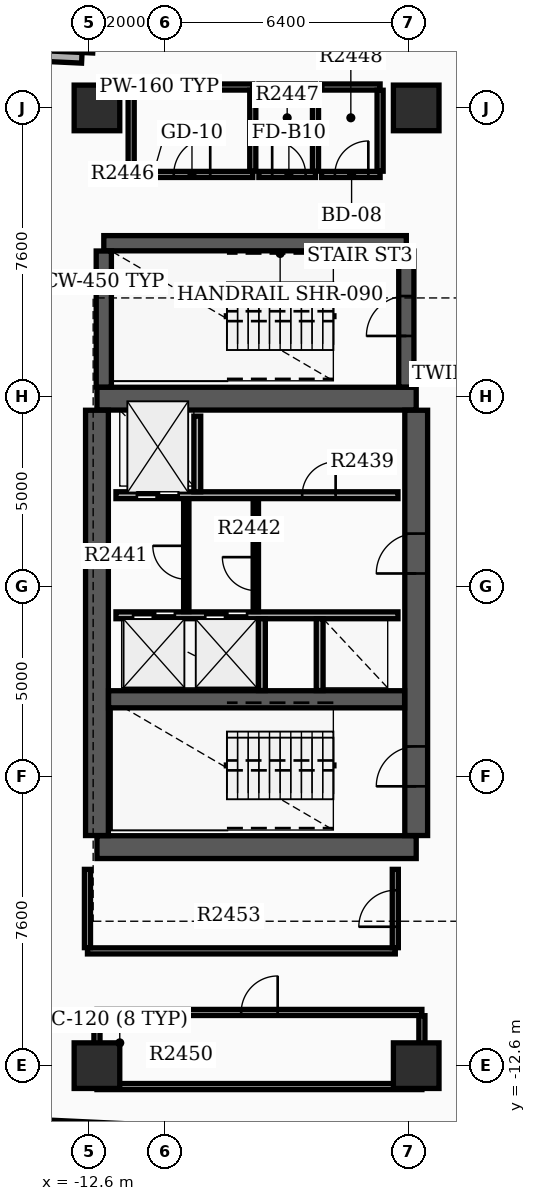
"""IFC4 building model, lengths in metres.
Left out: names, types, materials, properties, quantities, classifications, styles, units other than length and angle.
Written with IfcOpenShell. Run it as: python <this file> out.ifc"""

import sys

from ifc_helpers import new_model, si_unit, direction, frame, frame_2d, origin, origin_2d, place, context, subcontext, project, spatial, rectangle, extrude, element, fill, save


model = new_model("IFC4")
c1 = context("Model", 3, precision=1e-05, world=origin(), true_north=direction((0.0, 1.0)))
c2 = subcontext(c1, "Body", "Model", "MODEL_VIEW")
j1 = project(units=[si_unit("LENGTHUNIT", "METRE"), si_unit("PLANEANGLEUNIT", "RADIAN")], contexts=[c1])
p1 = place(None, origin())
s1 = spatial("IfcSite", under=j1, at=p1, CompositionType="ELEMENT")
p2 = place(p1, origin())
s2 = spatial("IfcBuilding", under=s1, at=p2, CompositionType="ELEMENT")
p3 = place(p2, frame((0.0, 0.0, 156.6)))
s3 = spatial("IfcBuildingStorey", under=s2, at=p3, CompositionType="ELEMENT", Elevation=156.6)
for number, where, z_axis, x_axis in (
    (1, (-12.4, -6.85, 0.0), (0.0, 0.0, 1.0), (1.0, 0.0, 0.0)),
    (2, (-12.4, 4.95, 0.0), (0.0, 0.0, 1.0), (1.0, 0.0, 0.0)),
):
    element("IfcWall", number, at=place(p3, frame(where, z_axis=z_axis, x_axis=x_axis)), inside=s3, PredefinedType="SHEAR", context=c2, shape_type="SweptSolid", body=[
        extrude(rectangle(XDim=8.4, YDim=0.6, at=frame_2d((4.2, 0.0))), origin(), (0.0, 0.0, 1.0), 3.7),
    ])
p4 = place(p3, frame((-12.4, -6.545, 0.0), z_axis=(0.0, 0.0, 1.0), x_axis=(0.0, 1.0, 0.0)))
e3 = element("IfcWall", 3, at=p4, inside=s3, PredefinedType="SHEAR", context=c2, shape_type="SweptSolid", body=[
    extrude(rectangle(XDim=11.19, YDim=0.6, at=frame_2d((5.595, 0.0))), origin(), (0.0, 0.0, 1.0), 3.7),
])
p5 = place(p3, frame((-4.0, -6.545, 0.0), z_axis=(0.0, 0.0, 1.0), x_axis=(0.0, 1.0, 0.0)))
e4 = element("IfcWall", 4, at=p5, inside=s3, PredefinedType="SHEAR", context=c2, shape_type="SweptSolid", body=[
    extrude(rectangle(XDim=11.19, YDim=0.6, at=frame_2d((5.595, 0.0))), origin(), (0.0, 0.0, 1.0), 3.7),
])
p6 = place(p5, frame((1.295, 0.0, 0.0)))
e5 = element("IfcOpeningElement", 5, at=p6, cuts=e4, PredefinedType="OPENING", context=c2, shape_type="SweptSolid", body=[
    extrude(rectangle(XDim=1.05, YDim=2.15, at=frame_2d((0.525, 1.075))), frame((0.0, 0.31, 0.0), z_axis=(0.0, -1.0, 0.0), x_axis=(1.0, 0.0, 0.0)), (0.0, 0.0, 1.0), 0.62),
])
p7 = place(p5, frame((6.895, 0.0, 0.0)))
e6 = element("IfcOpeningElement", 6, at=p7, cuts=e4, PredefinedType="OPENING", context=c2, shape_type="SweptSolid", body=[
    extrude(rectangle(XDim=1.05, YDim=2.15, at=frame_2d((0.525, 1.075))), frame((0.0, 0.31, 0.0), z_axis=(0.0, -1.0, 0.0), x_axis=(1.0, 0.0, 0.0)), (0.0, 0.0, 1.0), 0.62),
])
p8 = place(p3, frame((-12.095, -2.96, 0.0), z_axis=(0.0, 0.0, 1.0), x_axis=(1.0, 0.0, 0.0)))
e7 = element("IfcWall", 7, at=p8, inside=s3, PredefinedType="SHEAR", context=c2, shape_type="SweptSolid", body=[
    extrude(rectangle(XDim=7.79, YDim=0.45, at=frame_2d((3.895, 0.0))), origin(), (0.0, 0.0, 1.0), 3.7),
])
p9 = place(p3, frame((-12.22, 9.04, 0.0), z_axis=(0.0, 0.0, 1.0), x_axis=(1.0, 0.0, 0.0)))
e8 = element("IfcWall", 8, at=p9, inside=s3, PredefinedType="SHEAR", context=c2, shape_type="SweptSolid", body=[
    extrude(rectangle(XDim=7.96, YDim=0.4, at=frame_2d((3.98, 0.0))), origin(), (0.0, 0.0, 1.0), 3.7),
])
p10 = place(p3, frame((-12.22, 5.255, 0.0), z_axis=(0.0, 0.0, 1.0), x_axis=(0.0, 1.0, 0.0)))
e9 = element("IfcWall", 9, at=p10, inside=s3, PredefinedType="SHEAR", context=c2, shape_type="SweptSolid", body=[
    extrude(rectangle(XDim=3.58, YDim=0.4, at=frame_2d((1.79, 0.0))), origin(), (0.0, 0.0, 1.0), 3.7),
])
p11 = place(p3, frame((-4.26, 5.255, 0.0), z_axis=(0.0, 0.0, 1.0), x_axis=(0.0, 1.0, 0.0)))
e10 = element("IfcWall", 10, at=p11, inside=s3, PredefinedType="SHEAR", context=c2, shape_type="SweptSolid", body=[
    extrude(rectangle(XDim=3.58, YDim=0.4, at=frame_2d((1.79, 0.0))), origin(), (0.0, 0.0, 1.0), 3.7),
])
p12 = place(p11, frame((1.345, 0.0, 0.0)))
e11 = element("IfcOpeningElement", 11, at=p12, cuts=e10, PredefinedType="OPENING", context=c2, shape_type="SweptSolid", body=[
    extrude(rectangle(XDim=1.05, YDim=2.15, at=frame_2d((0.525, 1.075))), frame((0.0, 0.21, 0.0), z_axis=(0.0, -1.0, 0.0), x_axis=(1.0, 0.0, 0.0)), (0.0, 0.0, 1.0), 0.42),
])
for number, where, z_axis, x_axis in (
    (12, (-12.4, -12.6, 0.0), (0.0, 0.0, 1.0), (1.0, 0.0, 0.0)),
    (13, (-12.4, 12.6, 0.0), (0.0, 0.0, 1.0), (1.0, 0.0, 0.0)),
    (14, (-4.0, -12.6, 0.0), (0.0, 0.0, 1.0), (1.0, 0.0, 0.0)),
    (15, (-4.0, 12.6, 0.0), (0.0, 0.0, 1.0), (1.0, 0.0, 0.0)),
):
    element("IfcColumn", number, at=place(p3, frame(where, z_axis=z_axis, x_axis=x_axis)), inside=s3, PredefinedType="COLUMN", context=c2, shape_type="SweptSolid", body=[
        extrude(rectangle(XDim=1.2, YDim=1.2, at=origin_2d()), origin(), (0.0, 0.0, 1.0), 3.9),
    ])
p13 = place(p3, frame((-14.017, 13.976, 0.0), z_axis=(0.0, 0.0, 1.0), x_axis=(0.998883930236, -0.047232339719, 0.0)))
e16 = element("IfcWall", 16, at=p13, inside=s3, PredefinedType="STANDARD", context=c2, shape_type="SweptSolid", body=[
    extrude(rectangle(XDim=1.22, YDim=0.28, at=frame_2d((0.61, 0.0))), origin(), (0.0, 0.0, 1.0), 2.97),
])
p14 = place(p3, frame((-12.652, 14.052, 0.0), z_axis=(0.0, 0.0, 1.0), x_axis=(0.047039284441, 0.99889304018, 0.0)))
e17 = element("IfcWall", 17, at=p14, inside=s3, PredefinedType="STANDARD", context=c2, shape_type="SweptSolid", body=[
    extrude(rectangle(XDim=1.5, YDim=0.28, at=frame_2d((0.75, 0.0))), origin(), (0.0, 0.0, 1.0), 2.97),
])
p15 = place(p3, frame((-13.843, -14.164, 0.0), z_axis=(0.0, 0.0, 1.0), x_axis=(0.998889082162, -0.047123258997, 0.0)))
e18 = element("IfcWall", 18, at=p15, inside=s3, PredefinedType="STANDARD", context=c2, shape_type="SweptSolid", body=[
    extrude(rectangle(XDim=6.3, YDim=0.28, at=frame_2d((3.15, 0.0))), origin(), (0.0, 0.0, 1.0), 2.97),
])
p16 = place(p3, frame((-11.9, 2.41, 0.0), z_axis=(0.0, 0.0, 1.0), x_axis=(1.0, 0.0, 0.0)))
e19 = element("IfcWall", 19, at=p16, inside=s3, PredefinedType="SOLIDWALL", context=c2, shape_type="SweptSolid", body=[
    extrude(rectangle(XDim=7.42, YDim=0.18, at=frame_2d((3.71, 0.0))), origin(), (0.0, 0.0, 1.0), 2.96),
])
p17 = place(p16, frame((0.55, 0.0, 0.0)))
e20 = element("IfcOpeningElement", 20, at=p17, cuts=e19, PredefinedType="OPENING", context=c2, shape_type="SweptSolid", body=[
    extrude(rectangle(XDim=1.1, YDim=2.15, at=frame_2d((0.55, 1.075))), frame((0.0, 0.1, 0.0), z_axis=(0.0, -1.0, 0.0), x_axis=(1.0, 0.0, 0.0)), (0.0, 0.0, 1.0), 0.2),
])
p18 = place(p16, frame((4.9, 0.0, 0.0)))
e21 = element("IfcOpeningElement", 21, at=p18, cuts=e19, PredefinedType="OPENING", context=c2, shape_type="SweptSolid", body=[
    extrude(rectangle(XDim=0.88, YDim=2.1, at=frame_2d((0.44, 1.05))), frame((0.0, 0.1, 0.0), z_axis=(0.0, -1.0, 0.0), x_axis=(1.0, 0.0, 0.0)), (0.0, 0.0, 1.0), 0.2),
])
p19 = place(p3, frame((-11.9, -0.75, 0.0), z_axis=(0.0, 0.0, 1.0), x_axis=(1.0, 0.0, 0.0)))
e22 = element("IfcWall", 22, at=p19, inside=s3, PredefinedType="SOLIDWALL", context=c2, shape_type="SweptSolid", body=[
    extrude(rectangle(XDim=7.42, YDim=0.18, at=frame_2d((3.71, 0.0))), origin(), (0.0, 0.0, 1.0), 2.96),
])
p20 = place(p19, frame((0.45, 0.0, 0.0)))
e23 = element("IfcOpeningElement", 23, at=p20, cuts=e22, PredefinedType="OPENING", context=c2, shape_type="SweptSolid", body=[
    extrude(rectangle(XDim=1.1, YDim=2.15, at=frame_2d((0.55, 1.075))), frame((0.0, 0.1, 0.0), z_axis=(0.0, -1.0, 0.0), x_axis=(1.0, 0.0, 0.0)), (0.0, 0.0, 1.0), 0.2),
])
p21 = place(p19, frame((2.35, 0.0, 0.0)))
e24 = element("IfcOpeningElement", 24, at=p21, cuts=e22, PredefinedType="OPENING", context=c2, shape_type="SweptSolid", body=[
    extrude(rectangle(XDim=1.1, YDim=2.15, at=frame_2d((0.55, 1.075))), frame((0.0, 0.1, 0.0), z_axis=(0.0, -1.0, 0.0), x_axis=(1.0, 0.0, 0.0)), (0.0, 0.0, 1.0), 0.2),
])
p22 = place(p3, frame((-9.76, 2.5, 0.0), z_axis=(0.0, 0.0, 1.0), x_axis=(0.0, 1.0, 0.0)))
e25 = element("IfcWall", 25, at=p22, inside=s3, PredefinedType="SOLIDWALL", context=c2, shape_type="SweptSolid", body=[
    extrude(rectangle(XDim=1.99, YDim=0.18, at=frame_2d((0.995, 0.0))), origin(), (0.0, 0.0, 1.0), 2.96),
])
for number, where, z_axis, x_axis in (
    (26, (-8.06, -2.73, 0.0), (0.0, 0.0, 1.0), (0.0, 1.0, 0.0)),
    (27, (-6.54, -2.73, 0.0), (0.0, 0.0, 1.0), (0.0, 1.0, 0.0)),
):
    element("IfcWall", number, at=place(p3, frame(where, z_axis=z_axis, x_axis=x_axis)), inside=s3, PredefinedType="SOLIDWALL", context=c2, shape_type="SweptSolid", body=[
        extrude(rectangle(XDim=1.89, YDim=0.18, at=frame_2d((0.945, 0.0))), origin(), (0.0, 0.0, 1.0), 2.96),
    ])
p23 = place(p3, frame((-8.22, -0.65, 0.0), z_axis=(0.0, 0.0, 1.0), x_axis=(0.0, 1.0, 0.0)))
e28 = element("IfcWall", 28, at=p23, inside=s3, PredefinedType="SOLIDWALL", context=c2, shape_type="SweptSolid", body=[
    extrude(rectangle(XDim=2.96, YDim=0.14, at=frame_2d((1.48, 0.0))), origin(), (0.0, 0.0, 1.0), 2.96),
])
p24 = place(p23, frame((0.55, 0.0, 0.0)))
e29 = element("IfcOpeningElement", 29, at=p24, cuts=e28, PredefinedType="OPENING", context=c2, shape_type="SweptSolid", body=[
    extrude(rectangle(XDim=0.88, YDim=2.1, at=frame_2d((0.44, 1.05))), frame((0.0, 0.08, 0.0), z_axis=(0.0, -1.0, 0.0), x_axis=(1.0, 0.0, 0.0)), (0.0, 0.0, 1.0), 0.16),
])
p25 = place(p3, frame((-10.05, -0.652, 0.0), z_axis=(0.0, 0.0, 1.0), x_axis=(0.0, 1.0, 0.0)))
e30 = element("IfcWall", 30, at=p25, inside=s3, PredefinedType="PARTITIONING", context=c2, shape_type="SweptSolid", body=[
    extrude(rectangle(XDim=2.962, YDim=0.14, at=frame_2d((1.481, 0.0))), origin(), (0.0, 0.0, 1.0), 2.96),
])
p26 = place(p25, frame((0.85, 0.0, 0.0)))
e31 = element("IfcOpeningElement", 31, at=p26, cuts=e30, PredefinedType="OPENING", context=c2, shape_type="SweptSolid", body=[
    extrude(rectangle(XDim=0.88, YDim=2.1, at=frame_2d((0.44, 1.05))), frame((0.0, 0.08, 0.0), z_axis=(0.0, -1.0, 0.0), x_axis=(1.0, 0.0, 0.0)), (0.0, 0.0, 1.0), 0.16),
])
p27 = place(p3, frame((-11.5, 10.85, 0.0), z_axis=(0.0, 0.0, 1.0), x_axis=(1.0, 0.0, 0.0)))
e32 = element("IfcWall", 32, at=p27, inside=s3, PredefinedType="PARTITIONING", context=c2, shape_type="SweptSolid", body=[
    extrude(rectangle(XDim=3.2, YDim=0.16, at=frame_2d((1.6, 0.0))), origin(), (0.0, 0.0, 1.0), 2.96),
])
p28 = place(p27, frame((1.12, 0.0, 0.0)))
e33 = element("IfcOpeningElement", 33, at=p28, cuts=e32, PredefinedType="OPENING", context=c2, shape_type="SweptSolid", body=[
    extrude(rectangle(XDim=0.96, YDim=2.15, at=frame_2d((0.48, 1.075))), frame((0.0, 0.09, 0.0), z_axis=(0.0, -1.0, 0.0), x_axis=(1.0, 0.0, 0.0)), (0.0, 0.0, 1.0), 0.18),
])
p29 = place(p3, frame((-11.5, 13.15, 0.0), z_axis=(0.0, 0.0, 1.0), x_axis=(1.0, 0.0, 0.0)))
e34 = element("IfcWall", 34, at=p29, inside=s3, PredefinedType="PARTITIONING", context=c2, shape_type="SweptSolid", body=[
    extrude(rectangle(XDim=3.2, YDim=0.16, at=frame_2d((1.6, 0.0))), origin(), (0.0, 0.0, 1.0), 2.96),
])
for number, where, z_axis, x_axis in (
    (35, (-11.5, 10.935, 0.0), (0.0, 0.0, 1.0), (0.0, 1.0, 0.0)),
    (36, (-8.3, 10.935, 0.0), (0.0, 0.0, 1.0), (0.0, 1.0, 0.0)),
):
    element("IfcWall", number, at=place(p3, frame(where, z_axis=z_axis, x_axis=x_axis)), inside=s3, PredefinedType="PARTITIONING", context=c2, shape_type="SweptSolid", body=[
        extrude(rectangle(XDim=2.13, YDim=0.16, at=frame_2d((1.065, 0.0))), origin(), (0.0, 0.0, 1.0), 2.96),
    ])
p30 = place(p3, frame((-8.14, 10.85, 0.0), z_axis=(0.0, 0.0, 1.0), x_axis=(1.0, 0.0, 0.0)))
e37 = element("IfcWall", 37, at=p30, inside=s3, PredefinedType="PARTITIONING", context=c2, shape_type="SweptSolid", body=[
    extrude(rectangle(XDim=1.49, YDim=0.16, at=frame_2d((0.745, 0.0))), origin(), (0.0, 0.0, 1.0), 2.96),
])
p31 = place(p30, frame((0.35, 0.0, 0.0)))
e38 = element("IfcOpeningElement", 38, at=p31, cuts=e37, PredefinedType="OPENING", context=c2, shape_type="SweptSolid", body=[
    extrude(rectangle(XDim=0.88, YDim=2.1, at=frame_2d((0.44, 1.05))), frame((0.0, 0.09, 0.0), z_axis=(0.0, -1.0, 0.0), x_axis=(1.0, 0.0, 0.0)), (0.0, 0.0, 1.0), 0.18),
])
p32 = place(p3, frame((-8.14, 13.15, 0.0), z_axis=(0.0, 0.0, 1.0), x_axis=(1.0, 0.0, 0.0)))
e39 = element("IfcWall", 39, at=p32, inside=s3, PredefinedType="PARTITIONING", context=c2, shape_type="SweptSolid", body=[
    extrude(rectangle(XDim=1.49, YDim=0.16, at=frame_2d((0.745, 0.0))), origin(), (0.0, 0.0, 1.0), 2.96),
])
p33 = place(p3, frame((-6.65, 10.935, 0.0), z_axis=(0.0, 0.0, 1.0), x_axis=(0.0, 1.0, 0.0)))
e40 = element("IfcWall", 40, at=p33, inside=s3, PredefinedType="PARTITIONING", context=c2, shape_type="SweptSolid", body=[
    extrude(rectangle(XDim=2.13, YDim=0.16, at=frame_2d((1.065, 0.0))), origin(), (0.0, 0.0, 1.0), 2.96),
])
p34 = place(p3, frame((-6.49, 10.85, 0.0), z_axis=(0.0, 0.0, 1.0), x_axis=(1.0, 0.0, 0.0)))
e41 = element("IfcWall", 41, at=p34, inside=s3, PredefinedType="PARTITIONING", context=c2, shape_type="SweptSolid", body=[
    extrude(rectangle(XDim=1.54, YDim=0.16, at=frame_2d((0.77, 0.0))), origin(), (0.0, 0.0, 1.0), 2.96),
])
p35 = place(p34, frame((0.35, 0.0, 0.0)))
e42 = element("IfcOpeningElement", 42, at=p35, cuts=e41, PredefinedType="OPENING", context=c2, shape_type="SweptSolid", body=[
    extrude(rectangle(XDim=0.88, YDim=2.15, at=frame_2d((0.44, 1.075))), frame((0.0, 0.09, 0.0), z_axis=(0.0, -1.0, 0.0), x_axis=(1.0, 0.0, 0.0)), (0.0, 0.0, 1.0), 0.18),
])
p36 = place(p3, frame((-6.49, 13.15, 0.0), z_axis=(0.0, 0.0, 1.0), x_axis=(1.0, 0.0, 0.0)))
e43 = element("IfcWall", 43, at=p36, inside=s3, PredefinedType="PARTITIONING", context=c2, shape_type="SweptSolid", body=[
    extrude(rectangle(XDim=1.54, YDim=0.16, at=frame_2d((0.77, 0.0))), origin(), (0.0, 0.0, 1.0), 2.96),
])
p37 = place(p3, frame((-4.95, 10.935, 0.0), z_axis=(0.0, 0.0, 1.0), x_axis=(0.0, 1.0, 0.0)))
e44 = element("IfcWall", 44, at=p37, inside=s3, PredefinedType="PARTITIONING", context=c2, shape_type="SweptSolid", body=[
    extrude(rectangle(XDim=2.13, YDim=0.16, at=frame_2d((1.065, 0.0))), origin(), (0.0, 0.0, 1.0), 2.96),
])
p38 = place(p3, frame((-12.4, -13.15, 0.0), z_axis=(0.0, 0.0, 1.0), x_axis=(1.0, 0.0, 0.0)))
e45 = element("IfcWall", 45, at=p38, inside=s3, PredefinedType="PARTITIONING", context=c2, shape_type="SweptSolid", body=[
    extrude(rectangle(XDim=8.55, YDim=0.16, at=frame_2d((4.275, 0.0))), origin(), (0.0, 0.0, 1.0), 2.96),
])
p39 = place(p3, frame((-12.4, -11.2, 0.0), z_axis=(0.0, 0.0, 1.0), x_axis=(1.0, 0.0, 0.0)))
e46 = element("IfcWall", 46, at=p39, inside=s3, PredefinedType="PARTITIONING", context=c2, shape_type="SweptSolid", body=[
    extrude(rectangle(XDim=8.55, YDim=0.16, at=frame_2d((4.275, 0.0))), origin(), (0.0, 0.0, 1.0), 2.96),
])
p40 = place(p39, frame((3.795, 0.0, 0.0)))
e47 = element("IfcOpeningElement", 47, at=p40, cuts=e46, PredefinedType="OPENING", context=c2, shape_type="SweptSolid", body=[
    extrude(rectangle(XDim=0.96, YDim=2.15, at=frame_2d((0.48, 1.075))), frame((0.0, 0.09, 0.0), z_axis=(0.0, -1.0, 0.0), x_axis=(1.0, 0.0, 0.0)), (0.0, 0.0, 1.0), 0.18),
])
for number, where, z_axis, x_axis in (
    (48, (-12.4, -13.065, 0.0), (0.0, 0.0, 1.0), (0.0, 1.0, 0.0)),
    (49, (-3.85, -13.065, 0.0), (0.0, 0.0, 1.0), (0.0, 1.0, 0.0)),
):
    element("IfcWall", number, at=place(p3, frame(where, z_axis=z_axis, x_axis=x_axis)), inside=s3, PredefinedType="PARTITIONING", context=c2, shape_type="SweptSolid", body=[
        extrude(rectangle(XDim=1.78, YDim=0.16, at=frame_2d((0.89, 0.0))), origin(), (0.0, 0.0, 1.0), 2.96),
    ])
p41 = place(p3, frame((-12.65, -9.58, 0.0), z_axis=(0.0, 0.0, 1.0), x_axis=(1.0, 0.0, 0.0)))
e50 = element("IfcWall", 50, at=p41, inside=s3, PredefinedType="PARTITIONING", context=c2, shape_type="SweptSolid", body=[
    extrude(rectangle(XDim=8.1, YDim=0.16, at=frame_2d((4.05, 0.0))), origin(), (0.0, 0.0, 1.0), 2.96),
])
p42 = place(p3, frame((-12.65, -9.495, 0.0), z_axis=(0.0, 0.0, 1.0), x_axis=(0.0, 1.0, 0.0)))
e51 = element("IfcWall", 51, at=p42, inside=s3, PredefinedType="PARTITIONING", context=c2, shape_type="SweptSolid", body=[
    extrude(rectangle(XDim=2.06, YDim=0.16, at=frame_2d((1.03, 0.0))), origin(), (0.0, 0.0, 1.0), 2.96),
])
p43 = place(p3, frame((-4.55, -9.495, 0.0), z_axis=(0.0, 0.0, 1.0), x_axis=(0.0, 1.0, 0.0)))
e52 = element("IfcWall", 52, at=p43, inside=s3, PredefinedType="PARTITIONING", context=c2, shape_type="SweptSolid", body=[
    extrude(rectangle(XDim=2.06, YDim=0.16, at=frame_2d((1.03, 0.0))), origin(), (0.0, 0.0, 1.0), 2.96),
])
p44 = place(p43, frame((0.55, 0.0, 0.0)))
e53 = element("IfcOpeningElement", 53, at=p44, cuts=e52, PredefinedType="OPENING", context=c2, shape_type="SweptSolid", body=[
    extrude(rectangle(XDim=0.96, YDim=2.15, at=frame_2d((0.48, 1.075))), frame((0.0, 0.09, 0.0), z_axis=(0.0, -1.0, 0.0), x_axis=(1.0, 0.0, 0.0)), (0.0, 0.0, 1.0), 0.18),
])
p45 = place(p6, origin())
e54 = element("IfcDoor", 54, at=p45, inside=s3, OperationType="SINGLE_SWING_LEFT", PredefinedType="DOOR", context=c2, shape_type="SweptSolid", body=[
    extrude(rectangle(XDim=1.05, YDim=2.15, at=frame_2d((0.525, 1.075))), frame((0.0, 0.025, 0.0), z_axis=(0.0, -1.0, 0.0), x_axis=(1.0, 0.0, 0.0)), (0.0, 0.0, 1.0), 0.05),
])
fill(e5, e54)
p46 = place(p7, origin())
e55 = element("IfcDoor", 55, at=p46, inside=s3, OperationType="SINGLE_SWING_LEFT", PredefinedType="DOOR", context=c2, shape_type="SweptSolid", body=[
    extrude(rectangle(XDim=1.05, YDim=2.15, at=frame_2d((0.525, 1.075))), frame((0.0, 0.025, 0.0), z_axis=(0.0, -1.0, 0.0), x_axis=(1.0, 0.0, 0.0)), (0.0, 0.0, 1.0), 0.05),
])
fill(e6, e55)
p47 = place(p12, origin())
e56 = element("IfcDoor", 56, at=p47, inside=s3, OperationType="SINGLE_SWING_LEFT", PredefinedType="DOOR", context=c2, shape_type="SweptSolid", body=[
    extrude(rectangle(XDim=1.05, YDim=2.15, at=frame_2d((0.525, 1.075))), frame((0.0, 0.025, 0.0), z_axis=(0.0, -1.0, 0.0), x_axis=(1.0, 0.0, 0.0)), (0.0, 0.0, 1.0), 0.05),
])
fill(e11, e56)
p48 = place(p17, origin())
e57 = element("IfcDoor", 57, at=p48, inside=s3, OperationType="DOUBLE_DOOR_SLIDING", PredefinedType="DOOR", context=c2, shape_type="SweptSolid", body=[
    extrude(rectangle(XDim=1.1, YDim=2.15, at=frame_2d((0.55, 1.075))), frame((0.0, 0.025, 0.0), z_axis=(0.0, -1.0, 0.0), x_axis=(1.0, 0.0, 0.0)), (0.0, 0.0, 1.0), 0.05),
])
fill(e20, e57)
p49 = place(p20, origin())
e58 = element("IfcDoor", 58, at=p49, inside=s3, OperationType="DOUBLE_DOOR_SLIDING", PredefinedType="DOOR", context=c2, shape_type="SweptSolid", body=[
    extrude(rectangle(XDim=1.1, YDim=2.15, at=frame_2d((0.55, 1.075))), frame((0.0, 0.025, 0.0), z_axis=(0.0, -1.0, 0.0), x_axis=(1.0, 0.0, 0.0)), (0.0, 0.0, 1.0), 0.05),
])
fill(e23, e58)
p50 = place(p21, origin())
e59 = element("IfcDoor", 59, at=p50, inside=s3, OperationType="DOUBLE_DOOR_SLIDING", PredefinedType="DOOR", context=c2, shape_type="SweptSolid", body=[
    extrude(rectangle(XDim=1.1, YDim=2.15, at=frame_2d((0.55, 1.075))), frame((0.0, 0.025, 0.0), z_axis=(0.0, -1.0, 0.0), x_axis=(1.0, 0.0, 0.0)), (0.0, 0.0, 1.0), 0.05),
])
fill(e24, e59)
p51 = place(p18, origin())
e60 = element("IfcDoor", 60, at=p51, inside=s3, OperationType="SINGLE_SWING_RIGHT", PredefinedType="DOOR", context=c2, shape_type="SweptSolid", body=[
    extrude(rectangle(XDim=0.88, YDim=2.1, at=frame_2d((0.44, 1.05))), frame((0.0, 0.025, 0.0), z_axis=(0.0, -1.0, 0.0), x_axis=(1.0, 0.0, 0.0)), (0.0, 0.0, 1.0), 0.05),
])
fill(e21, e60)
p52 = place(p24, origin())
e61 = element("IfcDoor", 61, at=p52, inside=s3, OperationType="SINGLE_SWING_RIGHT", PredefinedType="DOOR", context=c2, shape_type="SweptSolid", body=[
    extrude(rectangle(XDim=0.88, YDim=2.1, at=frame_2d((0.44, 1.05))), frame((0.0, 0.025, 0.0), z_axis=(0.0, -1.0, 0.0), x_axis=(1.0, 0.0, 0.0)), (0.0, 0.0, 1.0), 0.05),
])
fill(e29, e61)
p53 = place(p26, origin())
e62 = element("IfcDoor", 62, at=p53, inside=s3, OperationType="SINGLE_SWING_RIGHT", PredefinedType="DOOR", context=c2, shape_type="SweptSolid", body=[
    extrude(rectangle(XDim=0.88, YDim=2.1, at=frame_2d((0.44, 1.05))), frame((0.0, 0.025, 0.0), z_axis=(0.0, -1.0, 0.0), x_axis=(1.0, 0.0, 0.0)), (0.0, 0.0, 1.0), 0.05),
])
fill(e31, e62)
p54 = place(p28, origin())
e63 = element("IfcDoor", 63, at=p54, inside=s3, OperationType="SINGLE_SWING_RIGHT", PredefinedType="DOOR", context=c2, shape_type="SweptSolid", body=[
    extrude(rectangle(XDim=0.96, YDim=2.15, at=frame_2d((0.48, 1.075))), frame((0.0, 0.025, 0.0), z_axis=(0.0, -1.0, 0.0), x_axis=(1.0, 0.0, 0.0)), (0.0, 0.0, 1.0), 0.05),
])
fill(e33, e63)
p55 = place(p31, origin())
e64 = element("IfcDoor", 64, at=p55, inside=s3, OperationType="SINGLE_SWING_LEFT", PredefinedType="DOOR", context=c2, shape_type="SweptSolid", body=[
    extrude(rectangle(XDim=0.88, YDim=2.1, at=frame_2d((0.44, 1.05))), frame((0.0, 0.025, 0.0), z_axis=(0.0, -1.0, 0.0), x_axis=(1.0, 0.0, 0.0)), (0.0, 0.0, 1.0), 0.05),
])
fill(e38, e64)
p56 = place(p35, origin())
e65 = element("IfcDoor", 65, at=p56, inside=s3, OperationType="SINGLE_SWING_RIGHT", PredefinedType="DOOR", context=c2, shape_type="SweptSolid", body=[
    extrude(rectangle(XDim=0.88, YDim=2.15, at=frame_2d((0.44, 1.075))), frame((0.0, 0.025, 0.0), z_axis=(0.0, -1.0, 0.0), x_axis=(1.0, 0.0, 0.0)), (0.0, 0.0, 1.0), 0.05),
])
fill(e42, e65)
p57 = place(p40, origin())
e66 = element("IfcDoor", 66, at=p57, inside=s3, OperationType="SINGLE_SWING_RIGHT", PredefinedType="DOOR", context=c2, shape_type="SweptSolid", body=[
    extrude(rectangle(XDim=0.96, YDim=2.15, at=frame_2d((0.48, 1.075))), frame((0.0, 0.025, 0.0), z_axis=(0.0, -1.0, 0.0), x_axis=(1.0, 0.0, 0.0)), (0.0, 0.0, 1.0), 0.05),
])
fill(e47, e66)
p58 = place(p44, origin())
e67 = element("IfcDoor", 67, at=p58, inside=s3, OperationType="SINGLE_SWING_LEFT", PredefinedType="DOOR", context=c2, shape_type="SweptSolid", body=[
    extrude(rectangle(XDim=0.96, YDim=2.15, at=frame_2d((0.48, 1.075))), frame((0.0, 0.025, 0.0), z_axis=(0.0, -1.0, 0.0), x_axis=(1.0, 0.0, 0.0)), (0.0, 0.0, 1.0), 0.05),
])
fill(e53, e67)
save(model, sys.argv[1])
